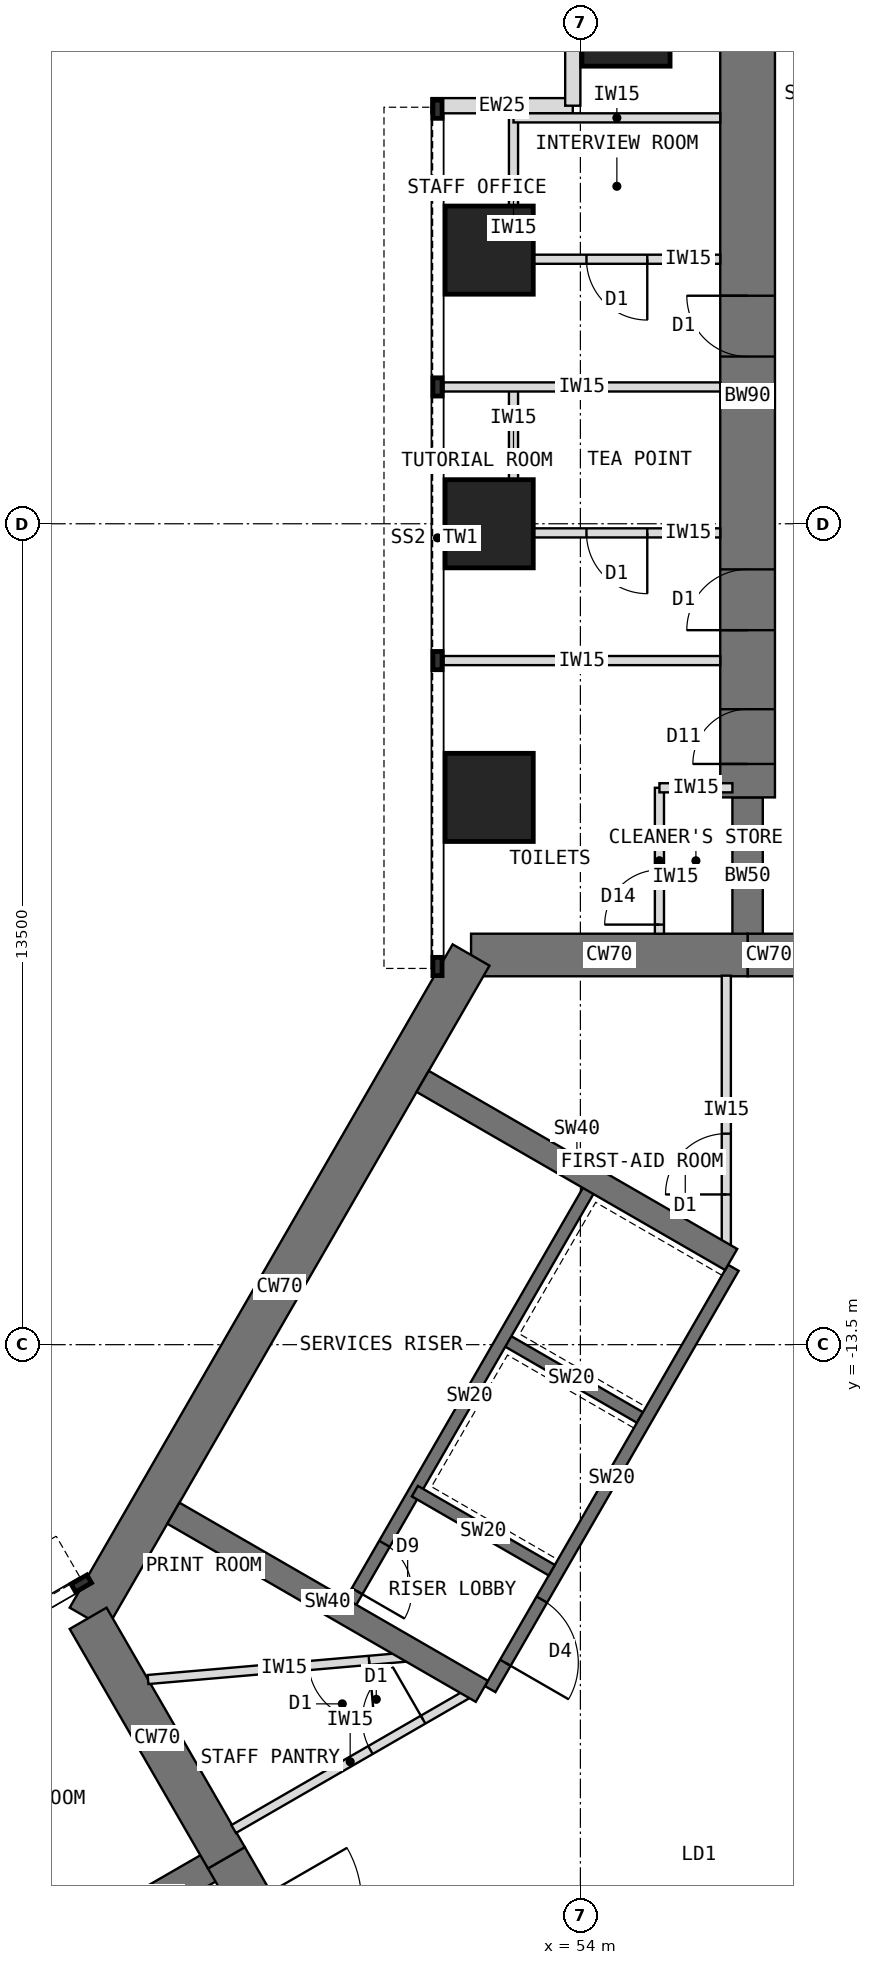
"""IFC4 building model, lengths in metres.
Left out: names, types, materials, properties, quantities, classifications, styles, units other than length and angle.
Written with IfcOpenShell. Run it as: python <this file> out.ifc"""

import sys

from ifc_helpers import new_model, si_unit, direction, frame, frame_2d, origin, origin_2d, place, context, subcontext, project, spatial, rectangle, extrude, element, fill, save


model = new_model("IFC4")
c1 = context("Model", 3, precision=1e-05, world=origin(), true_north=direction((0.0, 1.0)))
c2 = subcontext(c1, "Body", "Model", "MODEL_VIEW")
j1 = project(units=[si_unit("LENGTHUNIT", "METRE"), si_unit("PLANEANGLEUNIT", "RADIAN")], contexts=[c1])
p1 = place(None, origin())
s1 = spatial("IfcSite", under=j1, at=p1, CompositionType="ELEMENT")
p2 = place(p1, origin())
s2 = spatial("IfcBuilding", under=s1, at=p2, CompositionType="ELEMENT")
p3 = place(p2, frame((0.0, 0.0, 68.5)))
s3 = spatial("IfcBuildingStorey", under=s2, at=p3, CompositionType="ELEMENT", Elevation=68.5)
p4 = place(p3, frame((60.25, -7.092, 0.0), z_axis=(0.0, 0.0, 1.0), x_axis=(-1.0, 0.0, 0.0)))
e1 = element("IfcWall", 1, at=p4, inside=s3, PredefinedType="SHEAR", context=c2, shape_type="SweptSolid", body=[
    extrude(rectangle(XDim=3.5, YDim=0.7, at=frame_2d((1.75, 0.0))), origin(), (0.0, 0.0, 1.0), 4.0),
])
p5 = place(p4, frame((0.85, 0.0, 0.0)))
e2 = element("IfcOpeningElement", 2, at=p5, cuts=e1, PredefinedType="OPENING", context=c2, shape_type="SweptSolid", body=[
    extrude(rectangle(XDim=1.8, YDim=2.1, at=frame_2d((0.9, 1.05))), frame((0.0, 0.36, 0.0), z_axis=(0.0, -1.0, 0.0), x_axis=(1.0, 0.0, 0.0)), (0.0, 0.0, 1.0), 0.72),
])
p6 = place(p3, frame((56.75, -7.092, 0.0), z_axis=(0.0, 0.0, 1.0), x_axis=(-1.0, 0.0, 0.0)))
e3 = element("IfcWall", 3, at=p6, inside=s3, PredefinedType="SHEAR", context=c2, shape_type="SweptSolid", body=[
    extrude(rectangle(XDim=4.548, YDim=0.7, at=frame_2d((2.274, 0.0))), origin(), (0.0, 0.0, 1.0), 4.0),
])
p7 = place(p3, frame((52.202, -7.092, 0.0), z_axis=(0.0, 0.0, 1.0), x_axis=(-0.500005998175, -0.866021940709, 0.0)))
e4 = element("IfcWall", 4, at=p7, inside=s3, PredefinedType="SHEAR", context=c2, shape_type="SweptSolid", body=[
    extrude(rectangle(XDim=12.596, YDim=0.7, at=frame_2d((6.298, 0.0))), origin(), (0.0, 0.0, 1.0), 4.0),
])
p8 = place(p3, frame((45.904, -18.0, 0.0), z_axis=(0.0, 0.0, 1.0), x_axis=(0.500024481964, -0.866011268655, 0.0)))
e5 = element("IfcWall", 5, at=p8, inside=s3, PredefinedType="SHEAR", context=c2, shape_type="SweptSolid", body=[
    extrude(rectangle(XDim=4.548, YDim=0.7, at=frame_2d((2.274, 0.0))), origin(), (0.0, 0.0, 1.0), 4.0),
])
p9 = place(p3, frame((48.178, -21.939, 0.0), z_axis=(0.0, 0.0, 1.0), x_axis=(0.500010275428, -0.866019471182, 0.0)))
e6 = element("IfcWall", 6, at=p9, inside=s3, PredefinedType="SHEAR", context=c2, shape_type="SweptSolid", body=[
    extrude(rectangle(XDim=3.5, YDim=0.7, at=frame_2d((1.75, 0.0))), origin(), (0.0, 0.0, 1.0), 4.0),
])
p10 = place(p9, frame((0.85, 0.0, 0.0)))
e7 = element("IfcOpeningElement", 7, at=p10, cuts=e6, PredefinedType="OPENING", context=c2, shape_type="SweptSolid", body=[
    extrude(rectangle(XDim=1.8, YDim=2.1, at=frame_2d((0.9, 1.05))), frame((0.0, 0.36, 0.0), z_axis=(0.0, -1.0, 0.0), x_axis=(1.0, 0.0, 0.0)), (0.0, 0.0, 1.0), 0.72),
])
p11 = place(p3, frame((56.75, -7.092, 0.0), z_axis=(0.0, 0.0, 1.0), x_axis=(0.0, 1.0, 0.0)))
e8 = element("IfcWall", 8, at=p11, inside=s3, PredefinedType="SHEAR", context=c2, shape_type="SweptSolid", body=[
    extrude(rectangle(XDim=2.592, YDim=0.5, at=frame_2d((1.296, 0.0))), origin(), (0.0, 0.0, 1.0), 4.0),
])
p12 = place(p3, frame((56.75, -4.5, 0.0), z_axis=(0.0, 0.0, 1.0), x_axis=(0.0, 1.0, 0.0)))
e9 = element("IfcWall", 9, at=p12, inside=s3, PredefinedType="SHEAR", context=c2, shape_type="SweptSolid", body=[
    extrude(rectangle(XDim=13.2, YDim=0.9, at=frame_2d((6.6, 0.0))), origin(), (0.0, 0.0, 1.0), 4.0),
])
p13 = place(p12, frame((0.55, 0.0, 0.0)))
e10 = element("IfcOpeningElement", 10, at=p13, cuts=e9, PredefinedType="OPENING", context=c2, shape_type="SweptSolid", body=[
    extrude(rectangle(XDim=0.9, YDim=2.1, at=frame_2d((0.45, 1.05))), frame((0.0, 0.46, 0.0), z_axis=(0.0, -1.0, 0.0), x_axis=(1.0, 0.0, 0.0)), (0.0, 0.0, 1.0), 0.92),
])
p14 = place(p12, frame((2.75, 0.0, 0.0)))
e11 = element("IfcOpeningElement", 11, at=p14, cuts=e9, PredefinedType="OPENING", context=c2, shape_type="SweptSolid", body=[
    extrude(rectangle(XDim=1.0, YDim=2.1, at=frame_2d((0.5, 1.05))), frame((0.0, 0.46, 0.0), z_axis=(0.0, -1.0, 0.0), x_axis=(1.0, 0.0, 0.0)), (0.0, 0.0, 1.0), 0.92),
])
p15 = place(p12, frame((7.25, 0.0, 0.0)))
e12 = element("IfcOpeningElement", 12, at=p15, cuts=e9, PredefinedType="OPENING", context=c2, shape_type="SweptSolid", body=[
    extrude(rectangle(XDim=1.0, YDim=2.1, at=frame_2d((0.5, 1.05))), frame((0.0, 0.46, 0.0), z_axis=(0.0, -1.0, 0.0), x_axis=(1.0, 0.0, 0.0)), (0.0, 0.0, 1.0), 0.92),
])
p16 = place(p3, frame((48.178, -21.939, 0.0), z_axis=(0.0, 0.0, 1.0), x_axis=(-0.866072649678, -0.499918158782, 0.0)))
e13 = element("IfcWall", 13, at=p16, inside=s3, PredefinedType="SHEAR", context=c2, shape_type="SweptSolid", body=[
    extrude(rectangle(XDim=2.592, YDim=0.5, at=frame_2d((1.296, 0.0))), origin(), (0.0, 0.0, 1.0), 4.0),
])
for number, where, z_axis, x_axis in (
    (14, (52.5, -4.5, 0.0), (0.0, 0.0, 1.0), (1.0, 0.0, 0.0)),
    (15, (52.5, 0.0, 0.0), (0.0, 0.0, 1.0), (1.0, 0.0, 0.0)),
    (16, (52.5, 4.5, 0.0), (0.0, 0.0, 1.0), (1.0, 0.0, 0.0)),
    (17, (54.75, 8.25, 0.0), (0.0, 0.0, 1.0), (1.0, 0.0, 0.0)),
):
    element("IfcColumn", number, at=place(p3, frame(where, z_axis=z_axis, x_axis=x_axis)), inside=s3, PredefinedType="COLUMN", context=c2, shape_type="SweptSolid", body=[
        extrude(rectangle(XDim=1.45, YDim=1.45, at=origin_2d()), origin(), (0.0, 0.0, 1.0), 4.0),
    ])
for number, where, z_axis, x_axis in (
    (18, (51.55, 6.875, 0.0), (0.0, 0.0, 1.0), (1.0, 0.0, 0.0)),
    (19, (53.875, 6.875, 0.0), (0.0, 0.0, 1.0), (0.0, 1.0, 0.0)),
):
    element("IfcWall", number, at=place(p3, frame(where, z_axis=z_axis, x_axis=x_axis)), inside=s3, PredefinedType="STANDARD", context=c2, shape_type="SweptSolid", body=[
        extrude(rectangle(XDim=2.325, YDim=0.25, at=frame_2d((1.163, 0.0))), origin(), (0.0, 0.0, 1.0), 3.8),
    ])
p17 = place(p3, frame((56.516, -12.236, 0.0), z_axis=(0.0, 0.0, 1.0), x_axis=(-0.49999894854, -0.866026010844, 0.0)))
e20 = element("IfcWall", 20, at=p17, inside=s3, PredefinedType="SHEAR", context=c2, shape_type="SweptSolid", body=[
    extrude(rectangle(XDim=8.0, YDim=0.2, at=frame_2d((4.0, 0.0))), origin(), (0.0, 0.0, 1.0), 4.0),
])
p18 = place(p17, frame((6.3, 0.0, 0.0)))
e21 = element("IfcOpeningElement", 21, at=p18, cuts=e20, PredefinedType="OPENING", context=c2, shape_type="SweptSolid", body=[
    extrude(rectangle(XDim=1.2, YDim=2.1, at=frame_2d((0.6, 1.05))), frame((0.0, 0.11, 0.0), z_axis=(0.0, -1.0, 0.0), x_axis=(1.0, 0.0, 0.0)), (0.0, 0.0, 1.0), 0.22),
])
for number, where, z_axis, x_axis in (
    (22, (54.98, -14.697, 0.0), (0.0, 0.0, 1.0), (-0.866, 0.5, 0.0)),
    (23, (53.53, -17.209, 0.0), (0.0, 0.0, 1.0), (-0.866, 0.5, 0.0)),
):
    element("IfcWall", number, at=place(p3, frame(where, z_axis=z_axis, x_axis=x_axis)), inside=s3, PredefinedType="SHEAR", context=c2, shape_type="SweptSolid", body=[
        extrude(rectangle(XDim=2.6, YDim=0.2, at=frame_2d((1.3, 0.0))), origin(), (0.0, 0.0, 1.0), 4.0),
    ])
p19 = place(p3, frame((54.178, -10.886, 0.0), z_axis=(0.0, 0.0, 1.0), x_axis=(-0.49999894854, -0.866026010844, 0.0)))
e24 = element("IfcWall", 24, at=p19, inside=s3, PredefinedType="SHEAR", context=c2, shape_type="SweptSolid", body=[
    extrude(rectangle(XDim=8.0, YDim=0.2, at=frame_2d((4.0, 0.0))), origin(), (0.0, 0.0, 1.0), 4.0),
])
p20 = place(p19, frame((6.8, 0.0, 0.0)))
e25 = element("IfcOpeningElement", 25, at=p20, cuts=e24, PredefinedType="OPENING", context=c2, shape_type="SweptSolid", body=[
    extrude(rectangle(XDim=0.9, YDim=2.1, at=frame_2d((0.45, 1.05))), frame((0.0, 0.11, 0.0), z_axis=(0.0, -1.0, 0.0), x_axis=(1.0, 0.0, 0.0)), (0.0, 0.0, 1.0), 0.22),
])
for number, where, z_axis, x_axis in (
    (26, (52.38, -19.201, 0.0), (0.0, 0.0, 1.0), (-0.866, 0.5, 0.0)),
    (27, (56.48, -12.099, 0.0), (0.0, 0.0, 1.0), (-0.866, 0.5, 0.0)),
):
    element("IfcWall", number, at=place(p3, frame(where, z_axis=z_axis, x_axis=x_axis)), inside=s3, PredefinedType="SHEAR", context=c2, shape_type="SweptSolid", body=[
        extrude(rectangle(XDim=5.858, YDim=0.4, at=frame_2d((2.929, 0.0))), origin(), (0.0, 0.0, 1.0), 4.0),
    ])
for number, where, z_axis, x_axis in (
    (28, (56.3, -2.25, 0.0), (0.0, 0.0, 1.0), (-1.0, 0.0, 0.0)),
    (29, (56.3, 2.25, 0.0), (0.0, 0.0, 1.0), (-1.0, 0.0, 0.0)),
):
    element("IfcWall", number, at=place(p3, frame(where, z_axis=z_axis, x_axis=x_axis)), inside=s3, PredefinedType="PARTITIONING", context=c2, shape_type="SweptSolid", body=[
        extrude(rectangle(XDim=4.55, YDim=0.15, at=frame_2d((2.275, 0.0))), origin(), (0.0, 0.0, 1.0), 3.8),
    ])
p21 = place(p3, frame((52.9, -0.15, 0.0), z_axis=(0.0, 0.0, 1.0), x_axis=(0.0, 1.0, 0.0)))
e30 = element("IfcWall", 30, at=p21, inside=s3, PredefinedType="PARTITIONING", context=c2, shape_type="SweptSolid", body=[
    extrude(rectangle(XDim=2.4, YDim=0.15, at=frame_2d((1.2, 0.0))), origin(), (0.0, 0.0, 1.0), 3.8),
])
p22 = place(p3, frame((56.3, -0.15, 0.0), z_axis=(0.0, 0.0, 1.0), x_axis=(-1.0, 0.0, 0.0)))
e31 = element("IfcWall", 31, at=p22, inside=s3, PredefinedType="PARTITIONING", context=c2, shape_type="SweptSolid", body=[
    extrude(rectangle(XDim=3.4, YDim=0.15, at=frame_2d((1.7, 0.0))), origin(), (0.0, 0.0, 1.0), 3.8),
])
p23 = place(p22, frame((1.2, 0.0, 0.0)))
e32 = element("IfcOpeningElement", 32, at=p23, cuts=e31, PredefinedType="OPENING", context=c2, shape_type="SweptSolid", body=[
    extrude(rectangle(XDim=1.0, YDim=2.1, at=frame_2d((0.5, 1.05))), frame((0.0, 0.085, 0.0), z_axis=(0.0, -1.0, 0.0), x_axis=(1.0, 0.0, 0.0)), (0.0, 0.0, 1.0), 0.17),
])
p24 = place(p3, frame((52.9, 4.35, 0.0), z_axis=(0.0, 0.0, 1.0), x_axis=(0.0, 1.0, 0.0)))
e33 = element("IfcWall", 33, at=p24, inside=s3, PredefinedType="PARTITIONING", context=c2, shape_type="SweptSolid", body=[
    extrude(rectangle(XDim=2.4, YDim=0.15, at=frame_2d((1.2, 0.0))), origin(), (0.0, 0.0, 1.0), 3.8),
])
p25 = place(p3, frame((56.3, 4.35, 0.0), z_axis=(0.0, 0.0, 1.0), x_axis=(-1.0, 0.0, 0.0)))
e34 = element("IfcWall", 34, at=p25, inside=s3, PredefinedType="PARTITIONING", context=c2, shape_type="SweptSolid", body=[
    extrude(rectangle(XDim=3.4, YDim=0.15, at=frame_2d((1.7, 0.0))), origin(), (0.0, 0.0, 1.0), 3.8),
])
p26 = place(p25, frame((1.2, 0.0, 0.0)))
e35 = element("IfcOpeningElement", 35, at=p26, cuts=e34, PredefinedType="OPENING", context=c2, shape_type="SweptSolid", body=[
    extrude(rectangle(XDim=1.0, YDim=2.1, at=frame_2d((0.5, 1.05))), frame((0.0, 0.085, 0.0), z_axis=(0.0, -1.0, 0.0), x_axis=(1.0, 0.0, 0.0)), (0.0, 0.0, 1.0), 0.17),
])
p27 = place(p3, frame((56.3, 6.675, 0.0), z_axis=(0.0, 0.0, 1.0), x_axis=(-1.0, 0.0, 0.0)))
e36 = element("IfcWall", 36, at=p27, inside=s3, PredefinedType="PARTITIONING", context=c2, shape_type="SweptSolid", body=[
    extrude(rectangle(XDim=3.4, YDim=0.15, at=frame_2d((1.7, 0.0))), origin(), (0.0, 0.0, 1.0), 3.8),
])
p28 = place(p3, frame((55.3, -6.742, 0.0), z_axis=(0.0, 0.0, 1.0), x_axis=(0.0, 1.0, 0.0)))
e37 = element("IfcWall", 37, at=p28, inside=s3, PredefinedType="PARTITIONING", context=c2, shape_type="SweptSolid", body=[
    extrude(rectangle(XDim=2.4, YDim=0.15, at=frame_2d((1.2, 0.0))), origin(), (0.0, 0.0, 1.0), 3.8),
])
p29 = place(p28, frame((0.15, 0.0, 0.0)))
e38 = element("IfcOpeningElement", 38, at=p29, cuts=e37, PredefinedType="OPENING", context=c2, shape_type="SweptSolid", body=[
    extrude(rectangle(XDim=0.9, YDim=2.1, at=frame_2d((0.45, 1.05))), frame((0.0, 0.085, 0.0), z_axis=(0.0, -1.0, 0.0), x_axis=(1.0, 0.0, 0.0)), (0.0, 0.0, 1.0), 0.17),
])
p30 = place(p3, frame((56.5, -4.342, 0.0), z_axis=(0.0, 0.0, 1.0), x_axis=(-1.0, 0.0, 0.0)))
e39 = element("IfcWall", 39, at=p30, inside=s3, PredefinedType="PARTITIONING", context=c2, shape_type="SweptSolid", body=[
    extrude(rectangle(XDim=1.2, YDim=0.15, at=frame_2d((0.6, 0.0))), origin(), (0.0, 0.0, 1.0), 3.8),
])
p31 = place(p3, frame((48.298, -21.466, 0.0), z_axis=(0.0, 0.0, 1.0), x_axis=(0.866021148949, 0.500007369519, 0.0)))
e40 = element("IfcWall", 40, at=p31, inside=s3, PredefinedType="PARTITIONING", context=c2, shape_type="SweptSolid", body=[
    extrude(rectangle(XDim=4.426, YDim=0.15, at=frame_2d((2.213, 0.0))), origin(), (0.0, 0.0, 1.0), 3.8),
])
p32 = place(p31, frame((2.598, 0.0, 0.0)))
e41 = element("IfcOpeningElement", 41, at=p32, cuts=e40, PredefinedType="OPENING", context=c2, shape_type="SweptSolid", body=[
    extrude(rectangle(XDim=1.0, YDim=2.1, at=frame_2d((0.5, 1.05))), frame((0.0, 0.085, 0.0), z_axis=(0.0, -1.0, 0.0), x_axis=(1.0, 0.0, 0.0)), (0.0, 0.0, 1.0), 0.17),
])
p33 = place(p3, frame((56.4, -11.857, 0.0), z_axis=(0.0, 0.0, 1.0), x_axis=(0.0, 1.0, 0.0)))
e42 = element("IfcWall", 42, at=p33, inside=s3, PredefinedType="PARTITIONING", context=c2, shape_type="SweptSolid", body=[
    extrude(rectangle(XDim=4.426, YDim=0.15, at=frame_2d((2.213, 0.0))), origin(), (0.0, 0.0, 1.0), 3.8),
])
p34 = place(p33, frame((0.828, 0.0, 0.0)))
e43 = element("IfcOpeningElement", 43, at=p34, cuts=e42, PredefinedType="OPENING", context=c2, shape_type="SweptSolid", body=[
    extrude(rectangle(XDim=1.0, YDim=2.1, at=frame_2d((0.5, 1.05))), frame((0.0, 0.085, 0.0), z_axis=(0.0, -1.0, 0.0), x_axis=(1.0, 0.0, 0.0)), (0.0, 0.0, 1.0), 0.17),
])
p35 = place(p3, frame((51.371, -18.618, 0.0), z_axis=(0.0, 0.0, 1.0), x_axis=(-0.996259708579, -0.086409450071, 0.0)))
e44 = element("IfcWall", 44, at=p35, inside=s3, PredefinedType="PARTITIONING", context=c2, shape_type="SweptSolid", body=[
    extrude(rectangle(XDim=4.498, YDim=0.15, at=frame_2d((2.249, 0.0))), origin(), (0.0, 0.0, 1.0), 3.8),
])
p36 = place(p35, frame((0.849, 0.0, 0.0)))
e45 = element("IfcOpeningElement", 45, at=p36, cuts=e44, PredefinedType="OPENING", context=c2, shape_type="SweptSolid", body=[
    extrude(rectangle(XDim=1.0, YDim=2.1, at=frame_2d((0.5, 1.05))), frame((0.0, 0.085, 0.0), z_axis=(0.0, -1.0, 0.0), x_axis=(1.0, 0.0, 0.0)), (0.0, 0.0, 1.0), 0.17),
])
p37 = place(p18, origin())
e46 = element("IfcDoor", 46, at=p37, inside=s3, OperationType="SINGLE_SWING_RIGHT", PredefinedType="DOOR", context=c2, shape_type="SweptSolid", body=[
    extrude(rectangle(XDim=1.2, YDim=2.1, at=frame_2d((0.6, 1.05))), frame((0.0, 0.025, 0.0), z_axis=(0.0, -1.0, 0.0), x_axis=(1.0, 0.0, 0.0)), (0.0, 0.0, 1.0), 0.05),
])
fill(e21, e46)
p38 = place(p20, origin())
e47 = element("IfcDoor", 47, at=p38, inside=s3, OperationType="SINGLE_SWING_RIGHT", PredefinedType="DOOR", context=c2, shape_type="SweptSolid", body=[
    extrude(rectangle(XDim=0.9, YDim=2.1, at=frame_2d((0.45, 1.05))), frame((0.0, 0.025, 0.0), z_axis=(0.0, -1.0, 0.0), x_axis=(1.0, 0.0, 0.0)), (0.0, 0.0, 1.0), 0.05),
])
fill(e25, e47)
p39 = place(p23, origin())
e48 = element("IfcDoor", 48, at=p39, inside=s3, OperationType="SINGLE_SWING_LEFT", PredefinedType="DOOR", context=c2, shape_type="SweptSolid", body=[
    extrude(rectangle(XDim=1.0, YDim=2.1, at=frame_2d((0.5, 1.05))), frame((0.0, 0.025, 0.0), z_axis=(0.0, -1.0, 0.0), x_axis=(1.0, 0.0, 0.0)), (0.0, 0.0, 1.0), 0.05),
])
fill(e32, e48)
p40 = place(p26, origin())
e49 = element("IfcDoor", 49, at=p40, inside=s3, OperationType="SINGLE_SWING_LEFT", PredefinedType="DOOR", context=c2, shape_type="SweptSolid", body=[
    extrude(rectangle(XDim=1.0, YDim=2.1, at=frame_2d((0.5, 1.05))), frame((0.0, 0.025, 0.0), z_axis=(0.0, -1.0, 0.0), x_axis=(1.0, 0.0, 0.0)), (0.0, 0.0, 1.0), 0.05),
])
fill(e35, e49)
p41 = place(p29, origin())
e50 = element("IfcDoor", 50, at=p41, inside=s3, OperationType="SINGLE_SWING_LEFT", PredefinedType="DOOR", context=c2, shape_type="SweptSolid", body=[
    extrude(rectangle(XDim=0.9, YDim=2.1, at=frame_2d((0.45, 1.05))), frame((0.0, 0.025, 0.0), z_axis=(0.0, -1.0, 0.0), x_axis=(1.0, 0.0, 0.0)), (0.0, 0.0, 1.0), 0.05),
])
fill(e38, e50)
p42 = place(p36, origin())
e51 = element("IfcDoor", 51, at=p42, inside=s3, OperationType="SINGLE_SWING_LEFT", PredefinedType="DOOR", context=c2, shape_type="SweptSolid", body=[
    extrude(rectangle(XDim=1.0, YDim=2.1, at=frame_2d((0.5, 1.05))), frame((0.0, 0.025, 0.0), z_axis=(0.0, -1.0, 0.0), x_axis=(1.0, 0.0, 0.0)), (0.0, 0.0, 1.0), 0.05),
])
fill(e45, e51)
p43 = place(p32, origin())
e52 = element("IfcDoor", 52, at=p43, inside=s3, OperationType="SINGLE_SWING_RIGHT", PredefinedType="DOOR", context=c2, shape_type="SweptSolid", body=[
    extrude(rectangle(XDim=1.0, YDim=2.1, at=frame_2d((0.5, 1.05))), frame((0.0, 0.025, 0.0), z_axis=(0.0, -1.0, 0.0), x_axis=(1.0, 0.0, 0.0)), (0.0, 0.0, 1.0), 0.05),
])
fill(e41, e52)
p44 = place(p34, origin())
e53 = element("IfcDoor", 53, at=p44, inside=s3, OperationType="SINGLE_SWING_LEFT", PredefinedType="DOOR", context=c2, shape_type="SweptSolid", body=[
    extrude(rectangle(XDim=1.0, YDim=2.1, at=frame_2d((0.5, 1.05))), frame((0.0, 0.025, 0.0), z_axis=(0.0, -1.0, 0.0), x_axis=(1.0, 0.0, 0.0)), (0.0, 0.0, 1.0), 0.05),
])
fill(e43, e53)
p45 = place(p13, origin())
e54 = element("IfcDoor", 54, at=p45, inside=s3, OperationType="SINGLE_SWING_LEFT", PredefinedType="DOOR", context=c2, shape_type="SweptSolid", body=[
    extrude(rectangle(XDim=0.82, YDim=2.06, at=frame_2d((0.45, 1.03))), frame((0.0, 0.025, 0.0), z_axis=(0.0, -1.0, 0.0), x_axis=(1.0, 0.0, 0.0)), (0.0, 0.0, 1.0), 0.05),
    extrude(rectangle(XDim=0.04, YDim=2.1, at=frame_2d((0.02, 1.05))), frame((0.0, 0.45, 0.0), z_axis=(0.0, -1.0, 0.0), x_axis=(1.0, 0.0, 0.0)), (0.0, 0.0, 1.0), 0.899),
    extrude(rectangle(XDim=0.04, YDim=2.1, at=frame_2d((0.88, 1.05))), frame((0.0, 0.45, 0.0), z_axis=(0.0, -1.0, 0.0), x_axis=(1.0, 0.0, 0.0)), (0.0, 0.0, 1.0), 0.899),
    extrude(rectangle(XDim=0.82, YDim=0.04, at=frame_2d((0.45, 2.08))), frame((0.0, 0.45, 0.0), z_axis=(0.0, -1.0, 0.0), x_axis=(1.0, 0.0, 0.0)), (0.0, 0.0, 1.0), 0.899),
])
fill(e10, e54)
p46 = place(p14, origin())
e55 = element("IfcDoor", 55, at=p46, inside=s3, OperationType="SINGLE_SWING_LEFT", PredefinedType="DOOR", context=c2, shape_type="SweptSolid", body=[
    extrude(rectangle(XDim=0.92, YDim=2.06, at=frame_2d((0.5, 1.03))), frame((0.0, 0.025, 0.0), z_axis=(0.0, -1.0, 0.0), x_axis=(1.0, 0.0, 0.0)), (0.0, 0.0, 1.0), 0.05),
    extrude(rectangle(XDim=0.04, YDim=2.1, at=frame_2d((0.02, 1.05))), frame((0.0, 0.45, 0.0), z_axis=(0.0, -1.0, 0.0), x_axis=(1.0, 0.0, 0.0)), (0.0, 0.0, 1.0), 0.899),
    extrude(rectangle(XDim=0.04, YDim=2.1, at=frame_2d((0.98, 1.05))), frame((0.0, 0.45, 0.0), z_axis=(0.0, -1.0, 0.0), x_axis=(1.0, 0.0, 0.0)), (0.0, 0.0, 1.0), 0.899),
    extrude(rectangle(XDim=0.92, YDim=0.04, at=frame_2d((0.5, 2.08))), frame((0.0, 0.45, 0.0), z_axis=(0.0, -1.0, 0.0), x_axis=(1.0, 0.0, 0.0)), (0.0, 0.0, 1.0), 0.899),
])
fill(e11, e55)
p47 = place(p15, origin())
e56 = element("IfcDoor", 56, at=p47, inside=s3, OperationType="SINGLE_SWING_RIGHT", PredefinedType="DOOR", context=c2, shape_type="SweptSolid", body=[
    extrude(rectangle(XDim=0.92, YDim=2.06, at=frame_2d((0.5, 1.03))), frame((0.0, 0.025, 0.0), z_axis=(0.0, -1.0, 0.0), x_axis=(1.0, 0.0, 0.0)), (0.0, 0.0, 1.0), 0.05),
    extrude(rectangle(XDim=0.04, YDim=2.1, at=frame_2d((0.02, 1.05))), frame((0.0, 0.45, 0.0), z_axis=(0.0, -1.0, 0.0), x_axis=(1.0, 0.0, 0.0)), (0.0, 0.0, 1.0), 0.899),
    extrude(rectangle(XDim=0.04, YDim=2.1, at=frame_2d((0.98, 1.05))), frame((0.0, 0.45, 0.0), z_axis=(0.0, -1.0, 0.0), x_axis=(1.0, 0.0, 0.0)), (0.0, 0.0, 1.0), 0.899),
    extrude(rectangle(XDim=0.92, YDim=0.04, at=frame_2d((0.5, 2.08))), frame((0.0, 0.45, 0.0), z_axis=(0.0, -1.0, 0.0), x_axis=(1.0, 0.0, 0.0)), (0.0, 0.0, 1.0), 0.899),
])
fill(e12, e56)
save(model, sys.argv[1])
